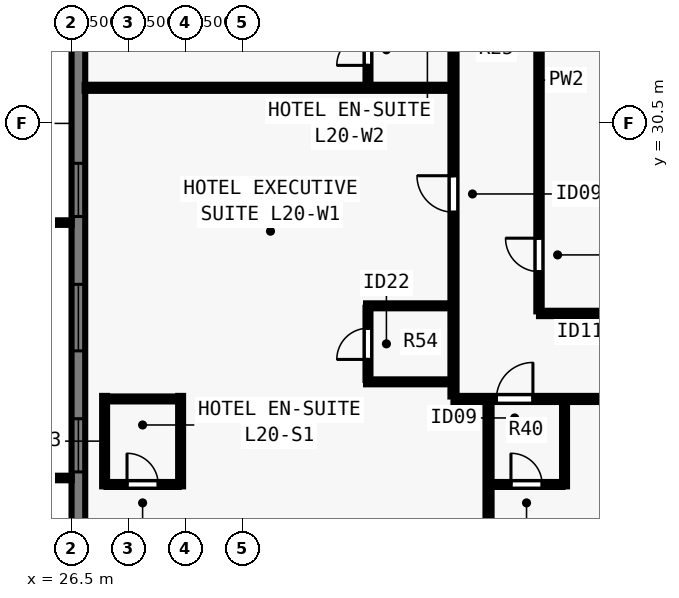
"""IFC4 building model, lengths in metres.
Left out: names, types, materials, properties, quantities, classifications, styles, units other than length and angle.
Written with IfcOpenShell. Run it as: python <this file> out.ifc"""

import sys

from ifc_helpers import new_model, si_unit, direction, frame, frame_2d, origin, place, context, subcontext, project, spatial, rectangle, extrude, element, fill, save


model = new_model("IFC4")
c1 = context("Model", 3, precision=1e-05, world=origin(), true_north=direction((0.0, 1.0)))
c2 = subcontext(c1, "Body", "Model", "MODEL_VIEW")
j1 = project(units=[si_unit("LENGTHUNIT", "METRE"), si_unit("PLANEANGLEUNIT", "RADIAN")], contexts=[c1])
p1 = place(None, origin())
s1 = spatial("IfcSite", under=j1, at=p1, CompositionType="ELEMENT")
p2 = place(p1, origin())
s2 = spatial("IfcBuilding", under=s1, at=p2, CompositionType="ELEMENT")
p3 = place(p2, frame((0.0, 0.0, 76.0)))
s3 = spatial("IfcBuildingStorey", under=s2, at=p3, CompositionType="ELEMENT", Elevation=76.0)
p4 = place(p3, frame((26.68, 16.5, 0.0), z_axis=(0.0, 0.0, 1.0), x_axis=(0.0, 1.0, 0.0)))
e1 = element("IfcWall", 1, at=p4, inside=s3, PredefinedType="SOLIDWALL", context=c2, shape_type="SweptSolid", body=[
    extrude(rectangle(XDim=44.662, YDim=0.36, at=frame_2d((22.331, 0.0))), origin(), (0.0, 0.0, 1.0), 3.28),
])
p5 = place(p4, frame((4.83, 0.0, 0.8)))
e2 = element("IfcOpeningElement", 2, at=p5, cuts=e1, PredefinedType="OPENING", context=c2, shape_type="SweptSolid", body=[
    extrude(rectangle(XDim=1.4, YDim=1.544, at=frame_2d((0.7, 0.772))), frame((0.0, 0.19, 0.0), z_axis=(0.0, -1.0, 0.0), x_axis=(1.0, 0.0, 0.0)), (0.0, 0.0, 1.0), 0.38),
])
p6 = place(p4, frame((8.015, 0.0, 0.8)))
e3 = element("IfcOpeningElement", 3, at=p6, cuts=e1, PredefinedType="OPENING", context=c2, shape_type="SweptSolid", body=[
    extrude(rectangle(XDim=1.75, YDim=1.544, at=frame_2d((0.875, 0.772))), frame((0.0, 0.19, 0.0), z_axis=(0.0, -1.0, 0.0), x_axis=(1.0, 0.0, 0.0)), (0.0, 0.0, 1.0), 0.38),
])
p7 = place(p4, frame((11.551, 0.0, 0.8)))
e4 = element("IfcOpeningElement", 4, at=p7, cuts=e1, PredefinedType="OPENING", context=c2, shape_type="SweptSolid", body=[
    extrude(rectangle(XDim=1.4, YDim=1.544, at=frame_2d((0.7, 0.772))), frame((0.0, 0.19, 0.0), z_axis=(0.0, -1.0, 0.0), x_axis=(1.0, 0.0, 0.0)), (0.0, 0.0, 1.0), 0.38),
])
p8 = place(p4, frame((18.721, 0.0, 0.8)))
e5 = element("IfcOpeningElement", 5, at=p8, cuts=e1, PredefinedType="OPENING", context=c2, shape_type="SweptSolid", body=[
    extrude(rectangle(XDim=1.4, YDim=1.544, at=frame_2d((0.7, 0.772))), frame((0.0, 0.19, 0.0), z_axis=(0.0, -1.0, 0.0), x_axis=(1.0, 0.0, 0.0)), (0.0, 0.0, 1.0), 0.38),
])
p9 = place(p4, frame((22.706, 0.0, 0.8)))
e6 = element("IfcOpeningElement", 6, at=p9, cuts=e1, PredefinedType="OPENING", context=c2, shape_type="SweptSolid", body=[
    extrude(rectangle(XDim=1.75, YDim=1.544, at=frame_2d((0.875, 0.772))), frame((0.0, 0.19, 0.0), z_axis=(0.0, -1.0, 0.0), x_axis=(1.0, 0.0, 0.0)), (0.0, 0.0, 1.0), 0.38),
])
p10 = place(p4, frame((24.991, 0.0, 0.8)))
e7 = element("IfcOpeningElement", 7, at=p10, cuts=e1, PredefinedType="OPENING", context=c2, shape_type="SweptSolid", body=[
    extrude(rectangle(XDim=1.4, YDim=1.544, at=frame_2d((0.7, 0.772))), frame((0.0, 0.19, 0.0), z_axis=(0.0, -1.0, 0.0), x_axis=(1.0, 0.0, 0.0)), (0.0, 0.0, 1.0), 0.38),
])
p11 = place(p4, frame((28.177, 0.0, 0.8)))
e8 = element("IfcOpeningElement", 8, at=p11, cuts=e1, PredefinedType="OPENING", context=c2, shape_type="SweptSolid", body=[
    extrude(rectangle(XDim=1.75, YDim=1.544, at=frame_2d((0.875, 0.772))), frame((0.0, 0.19, 0.0), z_axis=(0.0, -1.0, 0.0), x_axis=(1.0, 0.0, 0.0)), (0.0, 0.0, 1.0), 0.38),
])
p12 = place(p4, frame((31.711, 0.0, 0.8)))
e9 = element("IfcOpeningElement", 9, at=p12, cuts=e1, PredefinedType="OPENING", context=c2, shape_type="SweptSolid", body=[
    extrude(rectangle(XDim=1.4, YDim=1.544, at=frame_2d((0.7, 0.772))), frame((0.0, 0.19, 0.0), z_axis=(0.0, -1.0, 0.0), x_axis=(1.0, 0.0, 0.0)), (0.0, 0.0, 1.0), 0.38),
])
p13 = place(p4, frame((34.897, 0.0, 0.8)))
e10 = element("IfcOpeningElement", 10, at=p13, cuts=e1, PredefinedType="OPENING", context=c2, shape_type="SweptSolid", body=[
    extrude(rectangle(XDim=1.75, YDim=1.544, at=frame_2d((0.875, 0.772))), frame((0.0, 0.19, 0.0), z_axis=(0.0, -1.0, 0.0), x_axis=(1.0, 0.0, 0.0)), (0.0, 0.0, 1.0), 0.38),
])
p14 = place(p3, frame((36.55, 23.25, 0.0), z_axis=(0.0, 0.0, 1.0), x_axis=(1.0, 0.0, 0.0)))
e11 = element("IfcWall", 11, at=p14, inside=s3, PredefinedType="PARTITIONING", context=c2, shape_type="SweptSolid", body=[
    extrude(rectangle(XDim=30.9, YDim=0.16, at=frame_2d((15.45, 0.0))), origin(), (0.0, 0.0, 1.0), 3.28),
])
p15 = place(p14, frame((1.13, 0.0, 0.0)))
e12 = element("IfcOpeningElement", 12, at=p15, cuts=e11, PredefinedType="OPENING", context=c2, shape_type="SweptSolid", body=[
    extrude(rectangle(XDim=0.96, YDim=2.15, at=frame_2d((0.48, 1.075))), frame((0.0, 0.09, 0.0), z_axis=(0.0, -1.0, 0.0), x_axis=(1.0, 0.0, 0.0)), (0.0, 0.0, 1.0), 0.18),
])
p16 = place(p14, frame((6.093, 0.0, 0.0)))
e13 = element("IfcOpeningElement", 13, at=p16, cuts=e11, PredefinedType="OPENING", context=c2, shape_type="SweptSolid", body=[
    extrude(rectangle(XDim=0.96, YDim=2.15, at=frame_2d((0.48, 1.075))), frame((0.0, 0.09, 0.0), z_axis=(0.0, -1.0, 0.0), x_axis=(1.0, 0.0, 0.0)), (0.0, 0.0, 1.0), 0.18),
])
p17 = place(p14, frame((16.125, 0.0, 0.0)))
e14 = element("IfcOpeningElement", 14, at=p17, cuts=e11, PredefinedType="OPENING", context=c2, shape_type="SweptSolid", body=[
    extrude(rectangle(XDim=0.96, YDim=2.15, at=frame_2d((0.48, 1.075))), frame((0.0, 0.09, 0.0), z_axis=(0.0, -1.0, 0.0), x_axis=(1.0, 0.0, 0.0)), (0.0, 0.0, 1.0), 0.18),
])
p18 = place(p14, frame((26.157, 0.0, 0.0)))
e15 = element("IfcOpeningElement", 15, at=p18, cuts=e11, PredefinedType="OPENING", context=c2, shape_type="SweptSolid", body=[
    extrude(rectangle(XDim=0.96, YDim=2.15, at=frame_2d((0.48, 1.075))), frame((0.0, 0.09, 0.0), z_axis=(0.0, -1.0, 0.0), x_axis=(1.0, 0.0, 0.0)), (0.0, 0.0, 1.0), 0.18),
])
p19 = place(p14, frame((28.92, 0.0, 0.0)))
e16 = element("IfcOpeningElement", 16, at=p19, cuts=e11, PredefinedType="OPENING", context=c2, shape_type="SweptSolid", body=[
    extrude(rectangle(XDim=0.96, YDim=2.15, at=frame_2d((0.48, 1.075))), frame((0.0, 0.09, 0.0), z_axis=(0.0, -1.0, 0.0), x_axis=(1.0, 0.0, 0.0)), (0.0, 0.0, 1.0), 0.18),
])
p20 = place(p3, frame((36.55, 23.315, 0.0), z_axis=(0.0, 0.0, 1.0), x_axis=(0.0, 1.0, 0.0)))
e17 = element("IfcWall", 17, at=p20, inside=s3, PredefinedType="PARTITIONING", context=c2, shape_type="SweptSolid", body=[
    extrude(rectangle(XDim=31.37, YDim=0.16, at=frame_2d((15.685, 0.0))), origin(), (0.0, 0.0, 1.0), 3.28),
])
p21 = place(p20, frame((4.848, 0.0, 0.0)))
e18 = element("IfcOpeningElement", 18, at=p21, cuts=e17, PredefinedType="OPENING", context=c2, shape_type="SweptSolid", body=[
    extrude(rectangle(XDim=0.96, YDim=2.15, at=frame_2d((0.48, 1.075))), frame((0.0, 0.09, 0.0), z_axis=(0.0, -1.0, 0.0), x_axis=(1.0, 0.0, 0.0)), (0.0, 0.0, 1.0), 0.18),
])
p22 = place(p20, frame((12.39, 0.0, 0.0)))
e19 = element("IfcOpeningElement", 19, at=p22, cuts=e17, PredefinedType="OPENING", context=c2, shape_type="SweptSolid", body=[
    extrude(rectangle(XDim=0.96, YDim=2.15, at=frame_2d((0.48, 1.075))), frame((0.0, 0.09, 0.0), z_axis=(0.0, -1.0, 0.0), x_axis=(1.0, 0.0, 0.0)), (0.0, 0.0, 1.0), 0.18),
])
p23 = place(p20, frame((20.265, 0.0, 0.0)))
e20 = element("IfcOpeningElement", 20, at=p23, cuts=e17, PredefinedType="OPENING", context=c2, shape_type="SweptSolid", body=[
    extrude(rectangle(XDim=0.96, YDim=2.15, at=frame_2d((0.48, 1.075))), frame((0.0, 0.09, 0.0), z_axis=(0.0, -1.0, 0.0), x_axis=(1.0, 0.0, 0.0)), (0.0, 0.0, 1.0), 0.18),
])
p24 = place(p20, frame((28.223, 0.0, 0.0)))
e21 = element("IfcOpeningElement", 21, at=p24, cuts=e17, PredefinedType="OPENING", context=c2, shape_type="SweptSolid", body=[
    extrude(rectangle(XDim=0.96, YDim=2.15, at=frame_2d((0.48, 1.075))), frame((0.0, 0.09, 0.0), z_axis=(0.0, -1.0, 0.0), x_axis=(1.0, 0.0, 0.0)), (0.0, 0.0, 1.0), 0.18),
])
p25 = place(p3, frame((38.8, 25.5, 0.0), z_axis=(0.0, 0.0, 1.0), x_axis=(1.0, 0.0, 0.0)))
e22 = element("IfcWall", 22, at=p25, inside=s3, PredefinedType="PARTITIONING", context=c2, shape_type="SweptSolid", body=[
    extrude(rectangle(XDim=26.4, YDim=0.14, at=frame_2d((13.2, 0.0))), origin(), (0.0, 0.0, 1.0), 3.28),
])
p26 = place(p25, frame((2.2, 0.0, 0.0)))
e23 = element("IfcOpeningElement", 23, at=p26, cuts=e22, PredefinedType="OPENING", context=c2, shape_type="SweptSolid", body=[
    extrude(rectangle(XDim=0.96, YDim=2.12, at=frame_2d((0.48, 1.06))), frame((0.0, 0.08, 0.0), z_axis=(0.0, -1.0, 0.0), x_axis=(1.0, 0.0, 0.0)), (0.0, 0.0, 1.0), 0.16),
])
p27 = place(p25, frame((15.2, 0.0, 0.0)))
e24 = element("IfcOpeningElement", 24, at=p27, cuts=e22, PredefinedType="OPENING", context=c2, shape_type="SweptSolid", body=[
    extrude(rectangle(XDim=0.96, YDim=2.12, at=frame_2d((0.48, 1.06))), frame((0.0, 0.08, 0.0), z_axis=(0.0, -1.0, 0.0), x_axis=(1.0, 0.0, 0.0)), (0.0, 0.0, 1.0), 0.16),
])
p28 = place(p3, frame((38.8, 25.555, 0.0), z_axis=(0.0, 0.0, 1.0), x_axis=(0.0, 1.0, 0.0)))
e25 = element("IfcWall", 25, at=p28, inside=s3, PredefinedType="PARTITIONING", context=c2, shape_type="SweptSolid", body=[
    extrude(rectangle(XDim=13.195, YDim=0.14, at=frame_2d((6.598, 0.0))), origin(), (0.0, 0.0, 1.0), 3.28),
])
p29 = place(p28, frame((1.045, 0.0, 0.0)))
e26 = element("IfcOpeningElement", 26, at=p29, cuts=e25, PredefinedType="OPENING", context=c2, shape_type="SweptSolid", body=[
    extrude(rectangle(XDim=0.88, YDim=2.1, at=frame_2d((0.44, 1.05))), frame((0.0, 0.08, 0.0), z_axis=(0.0, -1.0, 0.0), x_axis=(1.0, 0.0, 0.0)), (0.0, 0.0, 1.0), 0.16),
])
p30 = place(p28, frame((10.245, 0.0, 0.0)))
e27 = element("IfcOpeningElement", 27, at=p30, cuts=e25, PredefinedType="OPENING", context=c2, shape_type="SweptSolid", body=[
    extrude(rectangle(XDim=0.88, YDim=2.1, at=frame_2d((0.44, 1.05))), frame((0.0, 0.08, 0.0), z_axis=(0.0, -1.0, 0.0), x_axis=(1.0, 0.0, 0.0)), (0.0, 0.0, 1.0), 0.16),
])
for number, where, z_axis, x_axis in (
    (28, (27.37, 20.95, 0.0), (0.0, 0.0, 1.0), (0.0, 1.0, 0.0)),
    (29, (29.37, 20.95, 0.0), (0.0, 0.0, 1.0), (0.0, 1.0, 0.0)),
):
    element("IfcWall", number, at=place(p3, frame(where, z_axis=z_axis, x_axis=x_axis)), inside=s3, PredefinedType="PLUMBINGWALL", context=c2, shape_type="SweptSolid", body=[
        extrude(rectangle(XDim=2.38, YDim=0.13, at=frame_2d((1.19, 0.0))), origin(), (0.0, 0.0, 1.0), 3.28),
    ])
p31 = place(p3, frame((27.42, 21.0, 0.0), z_axis=(0.0, 0.0, 1.0), x_axis=(1.0, 0.0, 0.0)))
e30 = element("IfcWall", 30, at=p31, inside=s3, PredefinedType="PLUMBINGWALL", context=c2, shape_type="SweptSolid", body=[
    extrude(rectangle(XDim=1.9, YDim=0.13, at=frame_2d((0.95, 0.0))), origin(), (0.0, 0.0, 1.0), 3.28),
])
p32 = place(p31, frame((0.54, 0.0, 0.0)))
e31 = element("IfcOpeningElement", 31, at=p32, cuts=e30, PredefinedType="OPENING", context=c2, shape_type="SweptSolid", body=[
    extrude(rectangle(XDim=0.82, YDim=2.1, at=frame_2d((0.41, 1.05))), frame((0.0, 0.075, 0.0), z_axis=(0.0, -1.0, 0.0), x_axis=(1.0, 0.0, 0.0)), (0.0, 0.0, 1.0), 0.15),
])
p33 = place(p3, frame((27.42, 23.25, 0.0), z_axis=(0.0, 0.0, 1.0), x_axis=(1.0, 0.0, 0.0)))
e32 = element("IfcWall", 32, at=p33, inside=s3, PredefinedType="PLUMBINGWALL", context=c2, shape_type="SweptSolid", body=[
    extrude(rectangle(XDim=1.9, YDim=0.13, at=frame_2d((0.95, 0.0))), origin(), (0.0, 0.0, 1.0), 3.28),
])
p34 = place(p3, frame((37.472, 13.845, 0.0), z_axis=(0.0, 0.0, 1.0), x_axis=(0.0, 1.0, 0.0)))
e33 = element("IfcWall", 33, at=p34, inside=s3, PredefinedType="PARTITIONING", context=c2, shape_type="SweptSolid", body=[
    extrude(rectangle(XDim=9.34, YDim=0.16, at=frame_2d((4.67, 0.0))), origin(), (0.0, 0.0, 1.0), 3.28),
])
p35 = place(p3, frame((39.472, 20.95, 0.0), z_axis=(0.0, 0.0, 1.0), x_axis=(0.0, 1.0, 0.0)))
e34 = element("IfcWall", 34, at=p35, inside=s3, PredefinedType="PLUMBINGWALL", context=c2, shape_type="SweptSolid", body=[
    extrude(rectangle(XDim=2.235, YDim=0.13, at=frame_2d((1.118, 0.0))), origin(), (0.0, 0.0, 1.0), 3.28),
])
p36 = place(p3, frame((37.537, 21.0, 0.0), z_axis=(0.0, 0.0, 1.0), x_axis=(1.0, 0.0, 0.0)))
e35 = element("IfcWall", 35, at=p36, inside=s3, PredefinedType="PLUMBINGWALL", context=c2, shape_type="SweptSolid", body=[
    extrude(rectangle(XDim=1.885, YDim=0.13, at=frame_2d((0.942, 0.0))), origin(), (0.0, 0.0, 1.0), 3.28),
])
p37 = place(p36, frame((0.525, 0.0, 0.0)))
e36 = element("IfcOpeningElement", 36, at=p37, cuts=e35, PredefinedType="OPENING", context=c2, shape_type="SweptSolid", body=[
    extrude(rectangle(XDim=0.82, YDim=2.1, at=frame_2d((0.41, 1.05))), frame((0.0, 0.075, 0.0), z_axis=(0.0, -1.0, 0.0), x_axis=(1.0, 0.0, 0.0)), (0.0, 0.0, 1.0), 0.15),
])
p38 = place(p3, frame((34.25, 23.7, 0.0), z_axis=(0.0, 0.0, 1.0), x_axis=(1.0, 0.0, 0.0)))
e37 = element("IfcWall", 37, at=p38, inside=s3, PredefinedType="PLUMBINGWALL", context=c2, shape_type="SweptSolid", body=[
    extrude(rectangle(XDim=2.235, YDim=0.13, at=frame_2d((1.118, 0.0))), origin(), (0.0, 0.0, 1.0), 2.849),
])
p39 = place(p3, frame((34.25, 25.7, 0.0), z_axis=(0.0, 0.0, 1.0), x_axis=(1.0, 0.0, 0.0)))
e38 = element("IfcWall", 38, at=p39, inside=s3, PredefinedType="PLUMBINGWALL", context=c2, shape_type="SweptSolid", body=[
    extrude(rectangle(XDim=2.235, YDim=0.13, at=frame_2d((1.118, 0.0))), origin(), (0.0, 0.0, 1.0), 3.28),
])
p40 = place(p3, frame((34.3, 23.75, 0.0), z_axis=(0.0, 0.0, 1.0), x_axis=(0.0, 1.0, 0.0)))
e39 = element("IfcWall", 39, at=p40, inside=s3, PredefinedType="PLUMBINGWALL", context=c2, shape_type="SweptSolid", body=[
    extrude(rectangle(XDim=1.9, YDim=0.13, at=frame_2d((0.95, 0.0))), origin(), (0.0, 0.0, 1.0), 3.28),
])
p41 = place(p40, frame((0.54, 0.0, 0.0)))
e40 = element("IfcOpeningElement", 40, at=p41, cuts=e39, PredefinedType="OPENING", context=c2, shape_type="SweptSolid", body=[
    extrude(rectangle(XDim=0.82, YDim=2.1, at=frame_2d((0.41, 1.05))), frame((0.0, 0.075, 0.0), z_axis=(0.0, -1.0, 0.0), x_axis=(1.0, 0.0, 0.0)), (0.0, 0.0, 1.0), 0.15),
])
p42 = place(p3, frame((26.845, 31.437, 0.0), z_axis=(0.0, 0.0, 1.0), x_axis=(1.0, 0.0, 0.0)))
e41 = element("IfcWall", 41, at=p42, inside=s3, PredefinedType="PARTITIONING", context=c2, shape_type="SweptSolid", body=[
    extrude(rectangle(XDim=9.64, YDim=0.16, at=frame_2d((4.82, 0.0))), origin(), (0.0, 0.0, 1.0), 3.28),
])
p43 = place(p3, frame((34.3, 31.502, 0.0), z_axis=(0.0, 0.0, 1.0), x_axis=(0.0, 1.0, 0.0)))
e42 = element("IfcWall", 42, at=p43, inside=s3, PredefinedType="PLUMBINGWALL", context=c2, shape_type="SweptSolid", body=[
    extrude(rectangle(XDim=1.885, YDim=0.13, at=frame_2d((0.942, 0.0))), origin(), (0.0, 0.0, 1.0), 3.28),
])
p44 = place(p43, frame((0.525, 0.0, 0.0)))
e43 = element("IfcOpeningElement", 43, at=p44, cuts=e42, PredefinedType="OPENING", context=c2, shape_type="SweptSolid", body=[
    extrude(rectangle(XDim=0.82, YDim=2.1, at=frame_2d((0.41, 1.05))), frame((0.0, 0.075, 0.0), z_axis=(0.0, -1.0, 0.0), x_axis=(1.0, 0.0, 0.0)), (0.0, 0.0, 1.0), 0.15),
])
p45 = place(p5, origin())
e44 = element("IfcWindow", 44, at=p45, inside=s3, PartitioningType="SINGLE_PANEL", PredefinedType="WINDOW", context=c2, shape_type="SweptSolid", body=[
    extrude(rectangle(XDim=1.4, YDim=1.544, at=frame_2d((0.7, 0.772))), frame((0.0, -0.05, 0.0), z_axis=(0.0, -1.0, 0.0), x_axis=(1.0, 0.0, 0.0)), (0.0, 0.0, 1.0), 0.06),
])
fill(e2, e44)
p46 = place(p6, origin())
e45 = element("IfcWindow", 45, at=p46, inside=s3, PartitioningType="SINGLE_PANEL", PredefinedType="WINDOW", context=c2, shape_type="SweptSolid", body=[
    extrude(rectangle(XDim=1.75, YDim=1.544, at=frame_2d((0.875, 0.772))), frame((0.0, -0.05, 0.0), z_axis=(0.0, -1.0, 0.0), x_axis=(1.0, 0.0, 0.0)), (0.0, 0.0, 1.0), 0.06),
])
fill(e3, e45)
p47 = place(p7, origin())
e46 = element("IfcWindow", 46, at=p47, inside=s3, PartitioningType="SINGLE_PANEL", PredefinedType="WINDOW", context=c2, shape_type="SweptSolid", body=[
    extrude(rectangle(XDim=1.4, YDim=1.544, at=frame_2d((0.7, 0.772))), frame((0.0, -0.05, 0.0), z_axis=(0.0, -1.0, 0.0), x_axis=(1.0, 0.0, 0.0)), (0.0, 0.0, 1.0), 0.06),
])
fill(e4, e46)
p48 = place(p29, origin())
e47 = element("IfcDoor", 47, at=p48, inside=s3, OperationType="SINGLE_SWING_RIGHT", PredefinedType="DOOR", context=c2, shape_type="SweptSolid", body=[
    extrude(rectangle(XDim=0.88, YDim=2.1, at=frame_2d((0.44, 1.05))), frame((0.0, 0.025, 0.0), z_axis=(0.0, -1.0, 0.0), x_axis=(1.0, 0.0, 0.0)), (0.0, 0.0, 1.0), 0.05),
])
fill(e26, e47)
p49 = place(p32, origin())
e48 = element("IfcDoor", 48, at=p49, inside=s3, OperationType="SINGLE_SWING_LEFT", PredefinedType="DOOR", context=c2, shape_type="SweptSolid", body=[
    extrude(rectangle(XDim=0.82, YDim=2.1, at=frame_2d((0.41, 1.05))), frame((0.0, 0.025, 0.0), z_axis=(0.0, -1.0, 0.0), x_axis=(1.0, 0.0, 0.0)), (0.0, 0.0, 1.0), 0.05),
])
fill(e31, e48)
p50 = place(p15, origin())
e49 = element("IfcDoor", 49, at=p50, inside=s3, OperationType="SINGLE_SWING_RIGHT", PredefinedType="DOOR", context=c2, shape_type="SweptSolid", body=[
    extrude(rectangle(XDim=0.96, YDim=2.15, at=frame_2d((0.48, 1.075))), frame((0.0, 0.025, 0.0), z_axis=(0.0, -1.0, 0.0), x_axis=(1.0, 0.0, 0.0)), (0.0, 0.0, 1.0), 0.05),
])
fill(e12, e49)
p51 = place(p37, origin())
e50 = element("IfcDoor", 50, at=p51, inside=s3, OperationType="SINGLE_SWING_LEFT", PredefinedType="DOOR", context=c2, shape_type="SweptSolid", body=[
    extrude(rectangle(XDim=0.82, YDim=2.1, at=frame_2d((0.41, 1.05))), frame((0.0, 0.025, 0.0), z_axis=(0.0, -1.0, 0.0), x_axis=(1.0, 0.0, 0.0)), (0.0, 0.0, 1.0), 0.05),
])
fill(e36, e50)
p52 = place(p41, origin())
e51 = element("IfcDoor", 51, at=p52, inside=s3, OperationType="SINGLE_SWING_LEFT", PredefinedType="DOOR", context=c2, shape_type="SweptSolid", body=[
    extrude(rectangle(XDim=0.82, YDim=2.1, at=frame_2d((0.41, 1.05))), frame((0.0, 0.025, 0.0), z_axis=(0.0, -1.0, 0.0), x_axis=(1.0, 0.0, 0.0)), (0.0, 0.0, 1.0), 0.05),
])
fill(e40, e51)
p53 = place(p21, origin())
e52 = element("IfcDoor", 52, at=p53, inside=s3, OperationType="SINGLE_SWING_RIGHT", PredefinedType="DOOR", context=c2, shape_type="SweptSolid", body=[
    extrude(rectangle(XDim=0.96, YDim=2.15, at=frame_2d((0.48, 1.075))), frame((0.0, 0.025, 0.0), z_axis=(0.0, -1.0, 0.0), x_axis=(1.0, 0.0, 0.0)), (0.0, 0.0, 1.0), 0.05),
])
fill(e18, e52)
p54 = place(p44, origin())
e53 = element("IfcDoor", 53, at=p54, inside=s3, OperationType="SINGLE_SWING_LEFT", PredefinedType="DOOR", context=c2, shape_type="SweptSolid", body=[
    extrude(rectangle(XDim=0.82, YDim=2.1, at=frame_2d((0.41, 1.05))), frame((0.0, 0.025, 0.0), z_axis=(0.0, -1.0, 0.0), x_axis=(1.0, 0.0, 0.0)), (0.0, 0.0, 1.0), 0.05),
])
fill(e43, e53)
save(model, sys.argv[1])
